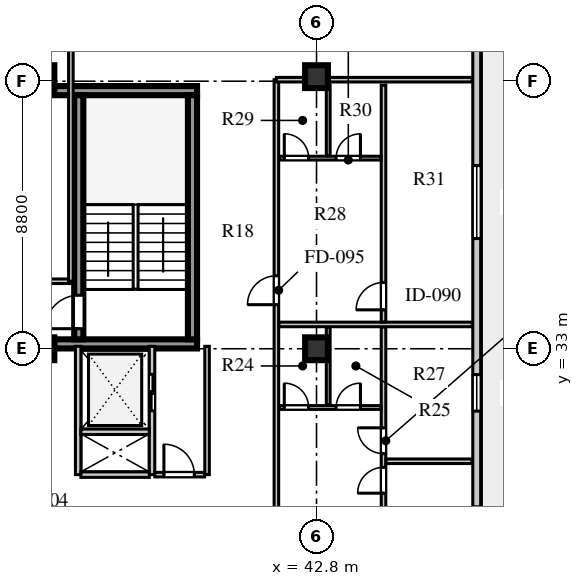
"""IFC4 building model, lengths in metres.
Left out: names, types, materials, properties, quantities, classifications, styles, units other than length and angle.
Written with IfcOpenShell. Run it as: python <this file> out.ifc"""

import sys

from ifc_helpers import new_model, si_unit, direction, frame, frame_2d, origin, origin_2d, place, context, subcontext, project, spatial, rectangle, extrude, element, fill, save


model = new_model("IFC4")
c1 = context("Model", 3, precision=1e-05, world=origin(), true_north=direction((0.0, 1.0)))
c2 = subcontext(c1, "Body", "Model", "MODEL_VIEW")
j1 = project(units=[si_unit("LENGTHUNIT", "METRE"), si_unit("PLANEANGLEUNIT", "RADIAN")], contexts=[c1])
p1 = place(None, origin())
s1 = spatial("IfcSite", under=j1, at=p1, CompositionType="ELEMENT")
p2 = place(p1, origin())
s2 = spatial("IfcBuilding", under=s1, at=p2, CompositionType="ELEMENT")
p3 = place(p2, frame((0.0, 0.0, 320.1)))
s3 = spatial("IfcBuildingStorey", under=s2, at=p3, CompositionType="ELEMENT", Elevation=320.1)
for number, where, z_axis, x_axis in (
    (1, (34.175, 33.16, 0.0), (0.0, 0.0, 1.0), (1.0, 0.0, 0.0)),
    (2, (34.175, 41.49, 0.0), (0.0, 0.0, 1.0), (1.0, 0.0, 0.0)),
):
    element("IfcWall", number, at=place(p3, frame(where, z_axis=z_axis, x_axis=x_axis)), inside=s3, PredefinedType="SHEAR", context=c2, shape_type="SweptSolid", body=[
        extrude(rectangle(XDim=4.695, YDim=0.3, at=frame_2d((2.348, 0.0))), origin(), (0.0, 0.0, 1.0), 3.56),
    ])
p4 = place(p3, frame((34.98, 33.31, 0.0), z_axis=(0.0, 0.0, 1.0), x_axis=(0.0, 1.0, 0.0)))
e3 = element("IfcWall", 3, at=p4, inside=s3, PredefinedType="SHEAR", context=c2, shape_type="SweptSolid", body=[
    extrude(rectangle(XDim=8.03, YDim=0.3, at=frame_2d((4.015, 0.0))), origin(), (0.0, 0.0, 1.0), 3.56),
])
p5 = place(p4, frame((0.35, 0.0, 0.0)))
e4 = element("IfcOpeningElement", 4, at=p5, cuts=e3, PredefinedType="OPENING", context=c2, shape_type="SweptSolid", body=[
    extrude(rectangle(XDim=1.1, YDim=2.1, at=frame_2d((0.55, 1.05))), frame((0.0, 0.16, 0.0), z_axis=(0.0, -1.0, 0.0), x_axis=(1.0, 0.0, 0.0)), (0.0, 0.0, 1.0), 0.32),
])
p6 = place(p3, frame((38.72, 33.31, 0.0), z_axis=(0.0, 0.0, 1.0), x_axis=(0.0, 1.0, 0.0)))
e5 = element("IfcWall", 5, at=p6, inside=s3, PredefinedType="SHEAR", context=c2, shape_type="SweptSolid", body=[
    extrude(rectangle(XDim=8.03, YDim=0.3, at=frame_2d((4.015, 0.0))), origin(), (0.0, 0.0, 1.0), 3.56),
])
for number, where, z_axis, x_axis in (
    (6, (33.8, 33.0, 0.0), (0.0, 0.0, 1.0), (1.0, 0.0, 0.0)),
    (7, (33.8, 41.95, 0.0), (0.0, 0.0, 1.0), (1.0, 0.0, 0.0)),
    (8, (42.8, 33.0, 0.0), (0.0, 0.0, 1.0), (1.0, 0.0, 0.0)),
    (9, (42.8, 41.95, 0.0), (0.0, 0.0, 1.0), (1.0, 0.0, 0.0)),
):
    element("IfcColumn", number, at=place(p3, frame(where, z_axis=z_axis, x_axis=x_axis)), inside=s3, PredefinedType="COLUMN", context=c2, shape_type="SweptSolid", body=[
        extrude(rectangle(XDim=0.75, YDim=0.75, at=origin_2d()), origin(), (0.0, 0.0, 1.0), 3.56),
    ])
p7 = place(p3, frame((48.07, 13.41, 0.0), z_axis=(0.0, 0.0, 1.0), x_axis=(0.0, 1.0, 0.0)))
e10 = element("IfcWall", 10, at=p7, inside=s3, PredefinedType="SOLIDWALL", context=c2, shape_type="SweptSolid", body=[
    extrude(rectangle(XDim=30.38, YDim=0.26, at=frame_2d((15.19, 0.0))), origin(), (0.0, 0.0, 1.0), 3.56),
])
p8 = place(p7, frame((2.43, 0.0, 0.0)))
e11 = element("IfcOpeningElement", 11, at=p8, cuts=e10, PredefinedType="OPENING", context=c2, shape_type="SweptSolid", body=[
    extrude(rectangle(XDim=1.0, YDim=2.05, at=frame_2d((0.5, 1.025))), frame((0.0, 0.14, 0.0), z_axis=(0.0, -1.0, 0.0), x_axis=(1.0, 0.0, 0.0)), (0.0, 0.0, 1.0), 0.28),
])
p9 = place(p7, frame((6.54, 0.0, 0.8)))
e12 = element("IfcOpeningElement", 12, at=p9, cuts=e10, PredefinedType="OPENING", context=c2, shape_type="SweptSolid", body=[
    extrude(rectangle(XDim=1.8, YDim=2.0, at=frame_2d((0.9, 1.0))), frame((0.0, 0.14, 0.0), z_axis=(0.0, -1.0, 0.0), x_axis=(1.0, 0.0, 0.0)), (0.0, 0.0, 1.0), 0.28),
])
p10 = place(p7, frame((12.89, 0.0, 0.8)))
e13 = element("IfcOpeningElement", 13, at=p10, cuts=e10, PredefinedType="OPENING", context=c2, shape_type="SweptSolid", body=[
    extrude(rectangle(XDim=1.5, YDim=2.0, at=frame_2d((0.75, 1.0))), frame((0.0, 0.14, 0.0), z_axis=(0.0, -1.0, 0.0), x_axis=(1.0, 0.0, 0.0)), (0.0, 0.0, 1.0), 0.28),
])
p11 = place(p7, frame((17.54, 0.0, 0.8)))
e14 = element("IfcOpeningElement", 14, at=p11, cuts=e10, PredefinedType="OPENING", context=c2, shape_type="SweptSolid", body=[
    extrude(rectangle(XDim=1.2, YDim=1.75, at=frame_2d((0.6, 0.875))), frame((0.0, 0.14, 0.0), z_axis=(0.0, -1.0, 0.0), x_axis=(1.0, 0.0, 0.0)), (0.0, 0.0, 1.0), 0.28),
])
p12 = place(p7, frame((23.215, 0.0, 0.8)))
e15 = element("IfcOpeningElement", 15, at=p12, cuts=e10, PredefinedType="OPENING", context=c2, shape_type="SweptSolid", body=[
    extrude(rectangle(XDim=2.4, YDim=2.05, at=frame_2d((1.2, 1.025))), frame((0.0, 0.14, 0.0), z_axis=(0.0, -1.0, 0.0), x_axis=(1.0, 0.0, 0.0)), (0.0, 0.0, 1.0), 0.28),
])
p13 = place(p3, frame((34.96, 28.86, 0.0), z_axis=(0.0, 0.0, 1.0), x_axis=(0.0, 1.0, 0.0)))
e16 = element("IfcWall", 16, at=p13, inside=s3, PredefinedType="SOLIDWALL", context=c2, shape_type="SweptSolid", body=[
    extrude(rectangle(XDim=4.22, YDim=0.18, at=frame_2d((2.11, 0.0))), origin(), (0.0, 0.0, 1.0), 3.56),
])
p14 = place(p3, frame((37.39, 28.86, 0.0), z_axis=(0.0, 0.0, 1.0), x_axis=(0.0, 1.0, 0.0)))
e17 = element("IfcWall", 17, at=p14, inside=s3, PredefinedType="SOLIDWALL", context=c2, shape_type="SweptSolid", body=[
    extrude(rectangle(XDim=4.22, YDim=0.18, at=frame_2d((2.11, 0.0))), origin(), (0.0, 0.0, 1.0), 3.56),
])
p15 = place(p14, frame((2.1, 0.0, 0.0)))
e18 = element("IfcOpeningElement", 18, at=p15, cuts=e17, PredefinedType="OPENING", context=c2, shape_type="SweptSolid", body=[
    extrude(rectangle(XDim=1.2, YDim=2.12, at=frame_2d((0.6, 1.06))), frame((0.0, 0.1, 0.0), z_axis=(0.0, -1.0, 0.0), x_axis=(1.0, 0.0, 0.0)), (0.0, 0.0, 1.0), 0.2),
])
for number, where, z_axis, x_axis in (
    (19, (35.05, 28.86, 0.0), (0.0, 0.0, 1.0), (1.0, 0.0, 0.0)),
    (20, (35.05, 30.27, 0.0), (0.0, 0.0, 1.0), (1.0, 0.0, 0.0)),
):
    element("IfcWall", number, at=place(p3, frame(where, z_axis=z_axis, x_axis=x_axis)), inside=s3, PredefinedType="SOLIDWALL", context=c2, shape_type="SweptSolid", body=[
        extrude(rectangle(XDim=2.25, YDim=0.18, at=frame_2d((1.125, 0.0))), origin(), (0.0, 0.0, 1.0), 3.56),
    ])
p16 = place(p3, frame((39.2, 28.86, 0.0), z_axis=(0.0, 0.0, 1.0), x_axis=(0.0, 1.0, 0.0)))
e21 = element("IfcWall", 21, at=p16, inside=s3, PredefinedType="PARTITIONING", context=c2, shape_type="SweptSolid", body=[
    extrude(rectangle(XDim=4.22, YDim=0.15, at=frame_2d((2.11, 0.0))), origin(), (0.0, 0.0, 1.0), 3.56),
])
p17 = place(p3, frame((37.48, 28.86, 0.0), z_axis=(0.0, 0.0, 1.0), x_axis=(1.0, 0.0, 0.0)))
e22 = element("IfcWall", 22, at=p17, inside=s3, PredefinedType="PARTITIONING", context=c2, shape_type="SweptSolid", body=[
    extrude(rectangle(XDim=1.64, YDim=0.15, at=frame_2d((0.82, 0.0))), origin(), (0.0, 0.0, 1.0), 3.56),
])
p18 = place(p17, frame((0.3, 0.0, 0.0)))
e23 = element("IfcOpeningElement", 23, at=p18, cuts=e22, PredefinedType="OPENING", context=c2, shape_type="SweptSolid", body=[
    extrude(rectangle(XDim=1.0, YDim=2.1, at=frame_2d((0.5, 1.05))), frame((0.0, 0.085, 0.0), z_axis=(0.0, -1.0, 0.0), x_axis=(1.0, 0.0, 0.0)), (0.0, 0.0, 1.0), 0.17),
])
p19 = place(p3, frame((25.22, 35.22, 0.0), z_axis=(0.0, 0.0, 1.0), x_axis=(1.0, 0.0, 0.0)))
e24 = element("IfcWall", 24, at=p19, inside=s3, PredefinedType="PARTITIONING", context=c2, shape_type="SweptSolid", body=[
    extrude(rectangle(XDim=9.5, YDim=0.15, at=frame_2d((4.75, 0.0))), origin(), (0.0, 0.0, 1.0), 3.56),
])
p20 = place(p19, frame((1.8, 0.0, 0.0)))
e25 = element("IfcOpeningElement", 25, at=p20, cuts=e24, PredefinedType="OPENING", context=c2, shape_type="SweptSolid", body=[
    extrude(rectangle(XDim=1.1, YDim=2.08, at=frame_2d((0.55, 1.04))), frame((0.0, 0.085, 0.0), z_axis=(0.0, -1.0, 0.0), x_axis=(1.0, 0.0, 0.0)), (0.0, 0.0, 1.0), 0.17),
])
p21 = place(p3, frame((34.72, 35.22, 0.0), z_axis=(0.0, 0.0, 1.0), x_axis=(0.0, 1.0, 0.0)))
e26 = element("IfcWall", 26, at=p21, inside=s3, PredefinedType="PARTITIONING", context=c2, shape_type="SweptSolid", body=[
    extrude(rectangle(XDim=11.6, YDim=0.15, at=frame_2d((5.8, 0.0))), origin(), (0.0, 0.0, 1.0), 3.56),
])
p22 = place(p3, frame((41.48, 15.35, 0.0), z_axis=(0.0, 0.0, 1.0), x_axis=(0.0, 1.0, 0.0)))
e27 = element("IfcWall", 27, at=p22, inside=s3, PredefinedType="PARTITIONING", context=c2, shape_type="SweptSolid", body=[
    extrude(rectangle(XDim=26.5, YDim=0.15, at=frame_2d((13.25, 0.0))), origin(), (0.0, 0.0, 1.0), 3.56),
])
p23 = place(p22, frame((0.75, 0.0, 0.0)))
e28 = element("IfcOpeningElement", 28, at=p23, cuts=e27, PredefinedType="OPENING", context=c2, shape_type="SweptSolid", body=[
    extrude(rectangle(XDim=0.95, YDim=2.1, at=frame_2d((0.475, 1.05))), frame((0.0, 0.085, 0.0), z_axis=(0.0, -1.0, 0.0), x_axis=(1.0, 0.0, 0.0)), (0.0, 0.0, 1.0), 0.17),
])
p24 = place(p22, frame((10.1, 0.0, 0.0)))
e29 = element("IfcOpeningElement", 29, at=p24, cuts=e27, PredefinedType="OPENING", context=c2, shape_type="SweptSolid", body=[
    extrude(rectangle(XDim=0.95, YDim=2.1, at=frame_2d((0.475, 1.05))), frame((0.0, 0.085, 0.0), z_axis=(0.0, -1.0, 0.0), x_axis=(1.0, 0.0, 0.0)), (0.0, 0.0, 1.0), 0.17),
])
p25 = place(p22, frame((19.1, 0.0, 0.0)))
e30 = element("IfcOpeningElement", 30, at=p25, cuts=e27, PredefinedType="OPENING", context=c2, shape_type="SweptSolid", body=[
    extrude(rectangle(XDim=0.95, YDim=2.1, at=frame_2d((0.475, 1.05))), frame((0.0, 0.085, 0.0), z_axis=(0.0, -1.0, 0.0), x_axis=(1.0, 0.0, 0.0)), (0.0, 0.0, 1.0), 0.17),
])
p26 = place(p3, frame((41.48, 41.85, 0.0), z_axis=(0.0, 0.0, 1.0), x_axis=(1.0, 0.0, 0.0)))
e31 = element("IfcWall", 31, at=p26, inside=s3, PredefinedType="PARTITIONING", context=c2, shape_type="SweptSolid", body=[
    extrude(rectangle(XDim=6.44, YDim=0.15, at=frame_2d((3.22, 0.0))), origin(), (0.0, 0.0, 1.0), 2.96),
])
p27 = place(p3, frame((45.004, 24.88, 0.0), z_axis=(0.0, 0.0, 1.0), x_axis=(0.0, 1.0, 0.0)))
e32 = element("IfcWall", 32, at=p27, inside=s3, PredefinedType="PARTITIONING", context=c2, shape_type="SweptSolid", body=[
    extrude(rectangle(XDim=8.84, YDim=0.15, at=frame_2d((4.42, 0.0))), origin(), (0.0, 0.0, 1.0), 3.56),
])
p28 = place(p27, frame((3.37, 0.0, 0.0)))
e33 = element("IfcOpeningElement", 33, at=p28, cuts=e32, PredefinedType="OPENING", context=c2, shape_type="SweptSolid", body=[
    extrude(rectangle(XDim=0.85, YDim=2.08, at=frame_2d((0.425, 1.04))), frame((0.0, 0.085, 0.0), z_axis=(0.0, -1.0, 0.0), x_axis=(1.0, 0.0, 0.0)), (0.0, 0.0, 1.0), 0.17),
])
p29 = place(p27, frame((4.67, 0.0, 0.0)))
e34 = element("IfcOpeningElement", 34, at=p29, cuts=e32, PredefinedType="OPENING", context=c2, shape_type="SweptSolid", body=[
    extrude(rectangle(XDim=0.85, YDim=2.08, at=frame_2d((0.425, 1.04))), frame((0.0, 0.085, 0.0), z_axis=(0.0, -1.0, 0.0), x_axis=(1.0, 0.0, 0.0)), (0.0, 0.0, 1.0), 0.17),
])
p30 = place(p3, frame((41.58, 31.068, 0.0), z_axis=(0.0, 0.0, 1.0), x_axis=(1.0, 0.0, 0.0)))
e35 = element("IfcWall", 35, at=p30, inside=s3, PredefinedType="PLUMBINGWALL", context=c2, shape_type="SweptSolid", body=[
    extrude(rectangle(XDim=3.344, YDim=0.125, at=frame_2d((1.672, 0.0))), origin(), (0.0, 0.0, 1.0), 3.56),
])
p31 = place(p30, frame((0.16, 0.0, 0.0)))
e36 = element("IfcOpeningElement", 36, at=p31, cuts=e35, PredefinedType="OPENING", context=c2, shape_type="SweptSolid", body=[
    extrude(rectangle(XDim=0.8, YDim=2.05, at=frame_2d((0.4, 1.025))), frame((0.0, 0.073, 0.0), z_axis=(0.0, -1.0, 0.0), x_axis=(1.0, 0.0, 0.0)), (0.0, 0.0, 1.0), 0.145),
])
p32 = place(p30, frame((1.865, 0.0, 0.0)))
e37 = element("IfcOpeningElement", 37, at=p32, cuts=e35, PredefinedType="OPENING", context=c2, shape_type="SweptSolid", body=[
    extrude(rectangle(XDim=0.8, YDim=2.05, at=frame_2d((0.4, 1.025))), frame((0.0, 0.073, 0.0), z_axis=(0.0, -1.0, 0.0), x_axis=(1.0, 0.0, 0.0)), (0.0, 0.0, 1.0), 0.145),
])
p33 = place(p3, frame((43.185, 31.148, 0.0), z_axis=(0.0, 0.0, 1.0), x_axis=(0.0, 1.0, 0.0)))
e38 = element("IfcWall", 38, at=p33, inside=s3, PredefinedType="PLUMBINGWALL", context=c2, shape_type="SweptSolid", body=[
    extrude(rectangle(XDim=2.572, YDim=0.125, at=frame_2d((1.286, 0.0))), origin(), (0.0, 0.0, 1.0), 3.56),
])
p34 = place(p3, frame((45.084, 29.3, 0.0), z_axis=(0.0, 0.0, 1.0), x_axis=(1.0, 0.0, 0.0)))
e39 = element("IfcWall", 39, at=p34, inside=s3, PredefinedType="PARTITIONING", context=c2, shape_type="SweptSolid", body=[
    extrude(rectangle(XDim=2.836, YDim=0.15, at=frame_2d((1.418, 0.0))), origin(), (0.0, 0.0, 1.0), 3.56),
])
p35 = place(p3, frame((41.56, 33.8, 0.0), z_axis=(0.0, 0.0, 1.0), x_axis=(1.0, 0.0, 0.0)))
e40 = element("IfcWall", 40, at=p35, inside=s3, PredefinedType="PARTITIONING", context=c2, shape_type="SweptSolid", body=[
    extrude(rectangle(XDim=6.36, YDim=0.15, at=frame_2d((3.18, 0.0))), origin(), (0.0, 0.0, 1.0), 3.56),
])
p36 = place(p3, frame((45.004, 33.88, 0.0), z_axis=(0.0, 0.0, 1.0), x_axis=(0.0, 1.0, 0.0)))
e41 = element("IfcWall", 41, at=p36, inside=s3, PredefinedType="PARTITIONING", context=c2, shape_type="SweptSolid", body=[
    extrude(rectangle(XDim=7.79, YDim=0.15, at=frame_2d((3.895, 0.0))), origin(), (0.0, 0.0, 1.0), 3.56),
])
p37 = place(p36, frame((0.4, 0.0, 0.0)))
e42 = element("IfcOpeningElement", 42, at=p37, cuts=e41, PredefinedType="OPENING", context=c2, shape_type="SweptSolid", body=[
    extrude(rectangle(XDim=0.9, YDim=2.08, at=frame_2d((0.45, 1.04))), frame((0.0, 0.085, 0.0), z_axis=(0.0, -1.0, 0.0), x_axis=(1.0, 0.0, 0.0)), (0.0, 0.0, 1.0), 0.17),
])
p38 = place(p3, frame((41.58, 39.27, 0.0), z_axis=(0.0, 0.0, 1.0), x_axis=(1.0, 0.0, 0.0)))
e43 = element("IfcWall", 43, at=p38, inside=s3, PredefinedType="PLUMBINGWALL", context=c2, shape_type="SweptSolid", body=[
    extrude(rectangle(XDim=3.344, YDim=0.125, at=frame_2d((1.672, 0.0))), origin(), (0.0, 0.0, 1.0), 3.56),
])
p39 = place(p38, frame((0.16, 0.0, 0.0)))
e44 = element("IfcOpeningElement", 44, at=p39, cuts=e43, PredefinedType="OPENING", context=c2, shape_type="SweptSolid", body=[
    extrude(rectangle(XDim=0.8, YDim=2.05, at=frame_2d((0.4, 1.025))), frame((0.0, 0.073, 0.0), z_axis=(0.0, -1.0, 0.0), x_axis=(1.0, 0.0, 0.0)), (0.0, 0.0, 1.0), 0.145),
])
p40 = place(p38, frame((1.865, 0.0, 0.0)))
e45 = element("IfcOpeningElement", 45, at=p40, cuts=e43, PredefinedType="OPENING", context=c2, shape_type="SweptSolid", body=[
    extrude(rectangle(XDim=0.8, YDim=2.05, at=frame_2d((0.4, 1.025))), frame((0.0, 0.073, 0.0), z_axis=(0.0, -1.0, 0.0), x_axis=(1.0, 0.0, 0.0)), (0.0, 0.0, 1.0), 0.145),
])
p41 = place(p3, frame((43.185, 39.35, 0.0), z_axis=(0.0, 0.0, 1.0), x_axis=(0.0, 1.0, 0.0)))
e46 = element("IfcWall", 46, at=p41, inside=s3, PredefinedType="PLUMBINGWALL", context=c2, shape_type="SweptSolid", body=[
    extrude(rectangle(XDim=2.32, YDim=0.125, at=frame_2d((1.16, 0.0))), origin(), (0.0, 0.0, 1.0), 3.56),
])
p42 = place(p11, origin())
e47 = element("IfcWindow", 47, at=p42, inside=s3, PartitioningType="SINGLE_PANEL", PredefinedType="WINDOW", context=c2, shape_type="SweptSolid", body=[
    extrude(rectangle(XDim=1.2, YDim=1.75, at=frame_2d((0.6, 0.875))), frame((0.0, 0.03, 0.0), z_axis=(0.0, -1.0, 0.0), x_axis=(1.0, 0.0, 0.0)), (0.0, 0.0, 1.0), 0.06),
])
fill(e14, e47)
p43 = place(p12, origin())
e48 = element("IfcWindow", 48, at=p43, inside=s3, PartitioningType="SINGLE_PANEL", PredefinedType="WINDOW", context=c2, shape_type="SweptSolid", body=[
    extrude(rectangle(XDim=2.4, YDim=2.05, at=frame_2d((1.2, 1.025))), frame((0.0, 0.03, 0.0), z_axis=(0.0, -1.0, 0.0), x_axis=(1.0, 0.0, 0.0)), (0.0, 0.0, 1.0), 0.06),
])
fill(e15, e48)
p44 = place(p5, origin())
e49 = element("IfcDoor", 49, at=p44, inside=s3, OperationType="SINGLE_SWING_LEFT", PredefinedType="DOOR", context=c2, shape_type="SweptSolid", body=[
    extrude(rectangle(XDim=1.1, YDim=2.1, at=frame_2d((0.55, 1.05))), frame((0.0, 0.025, 0.0), z_axis=(0.0, -1.0, 0.0), x_axis=(1.0, 0.0, 0.0)), (0.0, 0.0, 1.0), 0.05),
])
fill(e4, e49)
p45 = place(p15, frame((1.2, 0.0, 0.0), z_axis=(0.0, 0.0, 1.0), x_axis=(-1.0, 0.0, 0.0)))
e50 = element("IfcDoor", 50, at=p45, inside=s3, OperationType="DOUBLE_DOOR_SLIDING", PredefinedType="DOOR", context=c2, shape_type="SweptSolid", body=[
    extrude(rectangle(XDim=1.2, YDim=2.12, at=frame_2d((0.6, 1.06))), frame((0.0, 0.025, 0.0), z_axis=(0.0, -1.0, 0.0), x_axis=(1.0, 0.0, 0.0)), (0.0, 0.0, 1.0), 0.05),
])
fill(e18, e50)
p46 = place(p18, origin())
e51 = element("IfcDoor", 51, at=p46, inside=s3, OperationType="SINGLE_SWING_LEFT", PredefinedType="DOOR", context=c2, shape_type="SweptSolid", body=[
    extrude(rectangle(XDim=1.0, YDim=2.1, at=frame_2d((0.5, 1.05))), frame((0.0, 0.025, 0.0), z_axis=(0.0, -1.0, 0.0), x_axis=(1.0, 0.0, 0.0)), (0.0, 0.0, 1.0), 0.05),
])
fill(e23, e51)
p47 = place(p31, origin())
e52 = element("IfcDoor", 52, at=p47, inside=s3, OperationType="SINGLE_SWING_LEFT", PredefinedType="DOOR", context=c2, shape_type="SweptSolid", body=[
    extrude(rectangle(XDim=0.8, YDim=2.05, at=frame_2d((0.4, 1.025))), frame((0.0, 0.025, 0.0), z_axis=(0.0, -1.0, 0.0), x_axis=(1.0, 0.0, 0.0)), (0.0, 0.0, 1.0), 0.05),
])
fill(e36, e52)
p48 = place(p32, origin())
e53 = element("IfcDoor", 53, at=p48, inside=s3, OperationType="SINGLE_SWING_RIGHT", PredefinedType="DOOR", context=c2, shape_type="SweptSolid", body=[
    extrude(rectangle(XDim=0.8, YDim=2.05, at=frame_2d((0.4, 1.025))), frame((0.0, 0.025, 0.0), z_axis=(0.0, -1.0, 0.0), x_axis=(1.0, 0.0, 0.0)), (0.0, 0.0, 1.0), 0.05),
])
fill(e37, e53)
p49 = place(p28, origin())
e54 = element("IfcDoor", 54, at=p49, inside=s3, OperationType="SINGLE_SWING_LEFT", PredefinedType="DOOR", context=c2, shape_type="SweptSolid", body=[
    extrude(rectangle(XDim=0.85, YDim=2.08, at=frame_2d((0.425, 1.04))), frame((0.0, 0.025, 0.0), z_axis=(0.0, -1.0, 0.0), x_axis=(1.0, 0.0, 0.0)), (0.0, 0.0, 1.0), 0.05),
])
fill(e33, e54)
p50 = place(p29, origin())
e55 = element("IfcDoor", 55, at=p50, inside=s3, OperationType="SINGLE_SWING_RIGHT", PredefinedType="DOOR", context=c2, shape_type="SweptSolid", body=[
    extrude(rectangle(XDim=0.85, YDim=2.08, at=frame_2d((0.425, 1.04))), frame((0.0, 0.025, 0.0), z_axis=(0.0, -1.0, 0.0), x_axis=(1.0, 0.0, 0.0)), (0.0, 0.0, 1.0), 0.05),
])
fill(e34, e55)
p51 = place(p39, origin())
e56 = element("IfcDoor", 56, at=p51, inside=s3, OperationType="SINGLE_SWING_LEFT", PredefinedType="DOOR", context=c2, shape_type="SweptSolid", body=[
    extrude(rectangle(XDim=0.8, YDim=2.05, at=frame_2d((0.4, 1.025))), frame((0.0, 0.025, 0.0), z_axis=(0.0, -1.0, 0.0), x_axis=(1.0, 0.0, 0.0)), (0.0, 0.0, 1.0), 0.05),
])
fill(e44, e56)
p52 = place(p40, origin())
e57 = element("IfcDoor", 57, at=p52, inside=s3, OperationType="SINGLE_SWING_RIGHT", PredefinedType="DOOR", context=c2, shape_type="SweptSolid", body=[
    extrude(rectangle(XDim=0.8, YDim=2.05, at=frame_2d((0.4, 1.025))), frame((0.0, 0.025, 0.0), z_axis=(0.0, -1.0, 0.0), x_axis=(1.0, 0.0, 0.0)), (0.0, 0.0, 1.0), 0.05),
])
fill(e45, e57)
p53 = place(p37, origin())
e58 = element("IfcDoor", 58, at=p53, inside=s3, OperationType="SINGLE_SWING_LEFT", PredefinedType="DOOR", context=c2, shape_type="SweptSolid", body=[
    extrude(rectangle(XDim=0.9, YDim=2.08, at=frame_2d((0.45, 1.04))), frame((0.0, 0.025, 0.0), z_axis=(0.0, -1.0, 0.0), x_axis=(1.0, 0.0, 0.0)), (0.0, 0.0, 1.0), 0.05),
])
fill(e42, e58)
p54 = place(p25, origin())
e59 = element("IfcDoor", 59, at=p54, inside=s3, OperationType="SINGLE_SWING_LEFT", PredefinedType="DOOR", context=c2, shape_type="SweptSolid", body=[
    extrude(rectangle(XDim=0.95, YDim=2.1, at=frame_2d((0.475, 1.05))), frame((0.0, 0.025, 0.0), z_axis=(0.0, -1.0, 0.0), x_axis=(1.0, 0.0, 0.0)), (0.0, 0.0, 1.0), 0.05),
])
fill(e30, e59)
save(model, sys.argv[1])
